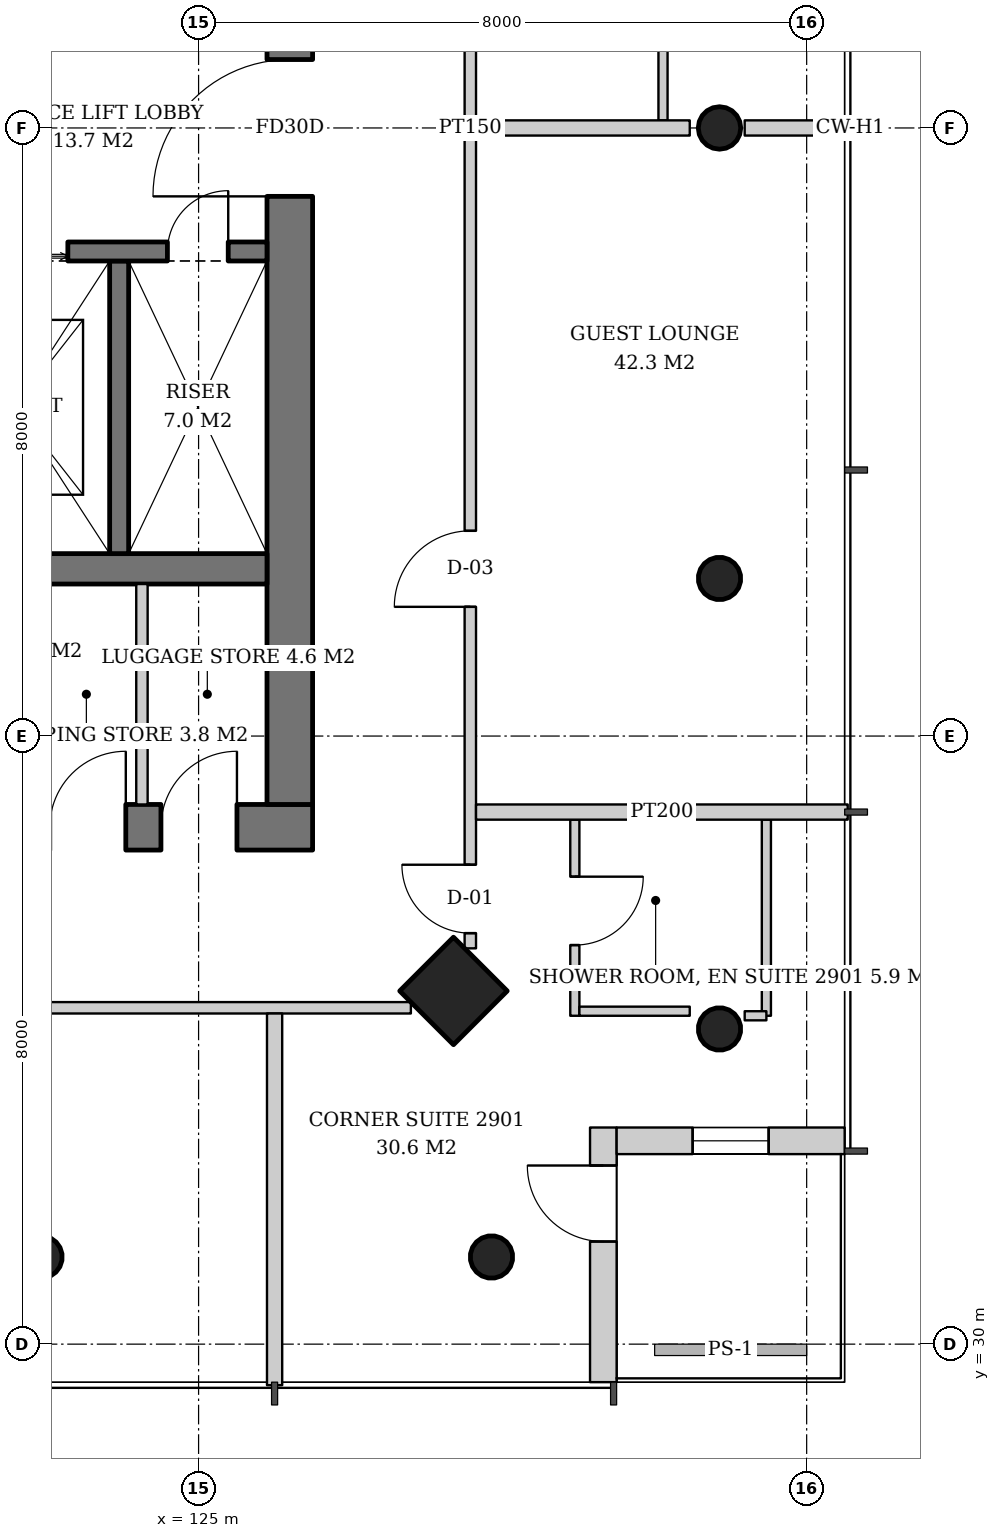
"""IFC4 building model, lengths in metres.
Left out: names, types, materials, properties, quantities, classifications, styles, units other than length and angle.
Written with IfcOpenShell. Run it as: python <this file> out.ifc"""

import sys

from ifc_helpers import new_model, si_unit, direction, frame, frame_2d, origin, origin_2d, place, context, subcontext, project, spatial, rectangle, hollow_circle, extrude, element, fill, save


model = new_model("IFC4")
c1 = context("Model", 3, precision=1e-05, world=origin(), true_north=direction((0.0, 1.0)))
c2 = subcontext(c1, "Body", "Model", "MODEL_VIEW")
j1 = project(units=[si_unit("LENGTHUNIT", "METRE"), si_unit("PLANEANGLEUNIT", "RADIAN")], contexts=[c1])
p1 = place(None, origin())
s1 = spatial("IfcSite", under=j1, at=p1, CompositionType="ELEMENT")
p2 = place(p1, origin())
s2 = spatial("IfcBuilding", under=s1, at=p2, CompositionType="ELEMENT")
p3 = place(p2, frame((0.0, 0.0, 116.0)))
s3 = spatial("IfcBuildingStorey", under=s2, at=p3, CompositionType="ELEMENT", Elevation=116.0)
p4 = place(p3, frame((131.905, 34.095, 0.0), z_axis=(-0.043029647111, 0.043029647111, 0.998146732169), x_axis=(-0.707106781187, -0.707106781187, 0.0)))
e1 = element("IfcColumn", 1, at=p4, inside=s3, PredefinedType="COLUMN", context=c2, shape_type="SweptSolid", body=[
    extrude(hollow_circle(Radius=0.28, WallThickness=0.02, at=origin_2d()), origin(), (0.0, 0.0, 1.0), 3.807),
])
p5 = place(p3, frame((131.905, 40.047, 0.0), z_axis=(-0.043059525333, 0.021561848751, 0.998839808957), x_axis=(-0.44774654769, -0.894160516368, 0.0)))
e2 = element("IfcColumn", 2, at=p5, inside=s3, PredefinedType="COLUMN", context=c2, shape_type="SweptSolid", body=[
    extrude(hollow_circle(Radius=0.28, WallThickness=0.02, at=origin_2d()), origin(), (0.0, 0.0, 1.0), 3.804),
])
p6 = place(p3, frame((131.905, 46.0, 0.0), z_axis=(-0.043069538298, 0.0, 0.999072076915), x_axis=(0.0, -1.0, 0.0)))
e3 = element("IfcColumn", 3, at=p6, inside=s3, PredefinedType="COLUMN", context=c2, shape_type="SweptSolid", body=[
    extrude(hollow_circle(Radius=0.28, WallThickness=0.02, at=origin_2d()), origin(), (0.0, 0.0, 1.0), 3.803),
])
p7 = place(p3, frame((128.405, 34.595, 0.0), z_axis=(-0.043029647111, 0.043029647111, 0.998146732169), x_axis=(-0.707106781187, -0.707106781187, 0.0)))
e4 = element("IfcColumn", 4, at=p7, inside=s3, PredefinedType="COLUMN", context=c2, shape_type="SweptSolid", body=[
    extrude(rectangle(XDim=1.0, YDim=1.0, at=origin_2d()), origin(), (0.0, 0.0, 1.0), 3.807),
])
p8 = place(p3, frame((128.905, 31.095, 0.0), z_axis=(-0.043029647111, 0.043029647111, 0.998146732169), x_axis=(-0.707106781187, -0.707106781187, 0.0)))
e5 = element("IfcColumn", 5, at=p8, inside=s3, PredefinedType="COLUMN", context=c2, shape_type="SweptSolid", body=[
    extrude(hollow_circle(Radius=0.28, WallThickness=0.02, at=origin_2d()), origin(), (0.0, 0.0, 1.0), 3.807),
])
p9 = place(p3, frame((122.953, 31.095, 0.0), z_axis=(-0.021561848751, 0.043059525333, 0.998839808957), x_axis=(-0.894160516368, -0.44774654769, 0.0)))
e6 = element("IfcColumn", 6, at=p9, inside=s3, PredefinedType="COLUMN", context=c2, shape_type="SweptSolid", body=[
    extrude(hollow_circle(Radius=0.28, WallThickness=0.02, at=origin_2d()), origin(), (0.0, 0.0, 1.0), 3.804),
])
p10 = place(p3, frame((107.5, 36.8, 0.0), z_axis=(0.0, 0.0, 1.0), x_axis=(1.0, 0.0, 0.0)))
e7 = element("IfcWall", 7, at=p10, inside=s3, PredefinedType="SHEAR", context=c2, shape_type="SweptSolid", body=[
    extrude(rectangle(XDim=19.0, YDim=0.6, at=frame_2d((9.5, 0.0))), origin(), (0.0, 0.0, 1.0), 3.8),
])
p11 = place(p10, frame((3.9, 0.0, 0.0)))
e8 = element("IfcOpeningElement", 8, at=p11, cuts=e7, PredefinedType="OPENING", context=c2, shape_type="SweptSolid", body=[
    extrude(rectangle(XDim=1.0, YDim=2.1, at=frame_2d((0.5, 1.05))), frame((0.0, 0.31, 0.0), z_axis=(0.0, -1.0, 0.0), x_axis=(1.0, 0.0, 0.0)), (0.0, 0.0, 1.0), 0.62),
])
p12 = place(p10, frame((14.08, 0.0, 0.0)))
e9 = element("IfcOpeningElement", 9, at=p12, cuts=e7, PredefinedType="OPENING", context=c2, shape_type="SweptSolid", body=[
    extrude(rectangle(XDim=1.0, YDim=2.1, at=frame_2d((0.5, 1.05))), frame((0.0, 0.31, 0.0), z_axis=(0.0, -1.0, 0.0), x_axis=(1.0, 0.0, 0.0)), (0.0, 0.0, 1.0), 0.62),
])
p13 = place(p10, frame((15.542, 0.0, 0.0)))
e10 = element("IfcOpeningElement", 10, at=p13, cuts=e7, PredefinedType="OPENING", context=c2, shape_type="SweptSolid", body=[
    extrude(rectangle(XDim=1.0, YDim=2.1, at=frame_2d((0.5, 1.05))), frame((0.0, 0.31, 0.0), z_axis=(0.0, -1.0, 0.0), x_axis=(1.0, 0.0, 0.0)), (0.0, 0.0, 1.0), 0.62),
])
p14 = place(p10, frame((17.005, 0.0, 0.0)))
e11 = element("IfcOpeningElement", 11, at=p14, cuts=e7, PredefinedType="OPENING", context=c2, shape_type="SweptSolid", body=[
    extrude(rectangle(XDim=1.0, YDim=2.1, at=frame_2d((0.5, 1.05))), frame((0.0, 0.31, 0.0), z_axis=(0.0, -1.0, 0.0), x_axis=(1.0, 0.0, 0.0)), (0.0, 0.0, 1.0), 0.62),
])
p15 = place(p3, frame((126.2, 37.1, 0.0), z_axis=(0.0, 0.0, 1.0), x_axis=(0.0, 1.0, 0.0)))
e12 = element("IfcWall", 12, at=p15, inside=s3, PredefinedType="SHEAR", context=c2, shape_type="SweptSolid", body=[
    extrude(rectangle(XDim=17.8, YDim=0.6, at=frame_2d((8.9, 0.0))), origin(), (0.0, 0.0, 1.0), 3.8),
])
p16 = place(p15, frame((8.0, 0.0, 0.0)))
e13 = element("IfcOpeningElement", 13, at=p16, cuts=e12, PredefinedType="OPENING", context=c2, shape_type="SweptSolid", body=[
    extrude(rectangle(XDim=1.8, YDim=2.4, at=frame_2d((0.9, 1.2))), frame((0.0, 0.31, 0.0), z_axis=(0.0, -1.0, 0.0), x_axis=(1.0, 0.0, 0.0)), (0.0, 0.0, 1.0), 0.62),
])
p17 = place(p3, frame((108.1, 40.2, 0.0), z_axis=(0.0, 0.0, 1.0), x_axis=(1.0, 0.0, 0.0)))
e14 = element("IfcWall", 14, at=p17, inside=s3, PredefinedType="SHEAR", context=c2, shape_type="SweptSolid", body=[
    extrude(rectangle(XDim=17.8, YDim=0.4, at=frame_2d((8.9, 0.0))), origin(), (0.0, 0.0, 1.0), 3.8),
])
p18 = place(p3, frame((130.325, 29.5, 0.0), z_axis=(0.0, 0.0, 1.0), x_axis=(0.0, 1.0, 0.0)))
e15 = element("IfcWall", 15, at=p18, inside=s3, PredefinedType="SOLIDWALL", context=c2, shape_type="SweptSolid", body=[
    extrude(rectangle(XDim=3.35, YDim=0.35, at=frame_2d((1.675, 0.0))), origin(), (0.0, 0.0, 1.0), 3.6),
])
p19 = place(p18, frame((1.85, 0.0, 0.0)))
e16 = element("IfcOpeningElement", 16, at=p19, cuts=e15, PredefinedType="OPENING", context=c2, shape_type="SweptSolid", body=[
    extrude(rectangle(XDim=1.0, YDim=2.4, at=frame_2d((0.5, 1.2))), frame((0.0, 0.185, 0.0), z_axis=(0.0, -1.0, 0.0), x_axis=(1.0, 0.0, 0.0)), (0.0, 0.0, 1.0), 0.37),
])
p20 = place(p3, frame((130.5, 32.675, 0.0), z_axis=(0.0, 0.0, 1.0), x_axis=(1.0, 0.0, 0.0)))
e17 = element("IfcWall", 17, at=p20, inside=s3, PredefinedType="SOLIDWALL", context=c2, shape_type="SweptSolid", body=[
    extrude(rectangle(XDim=3.0, YDim=0.35, at=frame_2d((1.5, 0.0))), origin(), (0.0, 0.0, 1.0), 3.6),
])
p21 = place(p20, frame((1.0, 0.0, 0.9)))
e18 = element("IfcOpeningElement", 18, at=p21, cuts=e17, PredefinedType="OPENING", context=c2, shape_type="SweptSolid", body=[
    extrude(rectangle(XDim=1.0, YDim=2.4, at=frame_2d((0.5, 1.2))), frame((0.0, 0.185, 0.0), z_axis=(0.0, -1.0, 0.0), x_axis=(1.0, 0.0, 0.0)), (0.0, 0.0, 1.0), 0.37),
])
p22 = place(p3, frame((123.955, 44.25, 0.0), z_axis=(0.0, 0.0, 1.0), x_axis=(0.0, -1.0, 0.0)))
e19 = element("IfcWall", 19, at=p22, inside=s3, PredefinedType="SHEAR", context=c2, shape_type="SweptSolid", body=[
    extrude(rectangle(XDim=3.85, YDim=0.25, at=frame_2d((1.925, 0.0))), origin(), (0.0, 0.0, 1.0), 3.8),
])
p23 = place(p3, frame((121.33, 44.375, 0.0), z_axis=(0.0, 0.0, 1.0), x_axis=(1.0, 0.0, 0.0)))
e20 = element("IfcWall", 20, at=p23, inside=s3, PredefinedType="SHEAR", context=c2, shape_type="SweptSolid", body=[
    extrude(rectangle(XDim=4.57, YDim=0.25, at=frame_2d((2.285, 0.0))), origin(), (0.0, 0.0, 1.0), 3.8),
])
p24 = place(p23, frame((0.55, 0.0, 0.0)))
e21 = element("IfcOpeningElement", 21, at=p24, cuts=e20, PredefinedType="OPENING", context=c2, shape_type="SweptSolid", body=[
    extrude(rectangle(XDim=1.4, YDim=2.4, at=frame_2d((0.7, 1.2))), frame((0.0, 0.135, 0.0), z_axis=(0.0, -1.0, 0.0), x_axis=(1.0, 0.0, 0.0)), (0.0, 0.0, 1.0), 0.27),
])
p25 = place(p23, frame((3.26, 0.0, 0.0)))
e22 = element("IfcOpeningElement", 22, at=p25, cuts=e20, PredefinedType="OPENING", context=c2, shape_type="SweptSolid", body=[
    extrude(rectangle(XDim=0.8, YDim=2.0, at=frame_2d((0.4, 1.0))), frame((0.0, 0.135, 0.0), z_axis=(0.0, -1.0, 0.0), x_axis=(1.0, 0.0, 0.0)), (0.0, 0.0, 1.0), 0.27),
])
p26 = place(p3, frame((124.255, 37.1, 0.0), z_axis=(0.0, 0.0, 1.0), x_axis=(0.0, 1.0, 0.0)))
e23 = element("IfcWall", 23, at=p26, inside=s3, PredefinedType="SOLIDWALL", context=c2, shape_type="SweptSolid", body=[
    extrude(rectangle(XDim=2.9, YDim=0.15, at=frame_2d((1.45, 0.0))), origin(), (0.0, 0.0, 1.0), 3.6),
])
p27 = place(p3, frame((129.95, 36.9, 0.0), z_axis=(0.0, 0.0, 1.0), x_axis=(0.0, -1.0, 0.0)))
e24 = element("IfcWall", 24, at=p27, inside=s3, PredefinedType="PARTITIONING", context=c2, shape_type="SweptSolid", body=[
    extrude(rectangle(XDim=2.58, YDim=0.12, at=frame_2d((1.29, 0.0))), origin(), (0.0, 0.0, 1.0), 2.9),
])
p28 = place(p27, frame((0.75, 0.0, 0.0)))
e25 = element("IfcOpeningElement", 25, at=p28, cuts=e24, PredefinedType="OPENING", context=c2, shape_type="SweptSolid", body=[
    extrude(rectangle(XDim=0.9, YDim=2.1, at=frame_2d((0.45, 1.05))), frame((0.0, 0.07, 0.0), z_axis=(0.0, -1.0, 0.0), x_axis=(1.0, 0.0, 0.0)), (0.0, 0.0, 1.0), 0.14),
])
p29 = place(p3, frame((132.47, 36.9, 0.0), z_axis=(0.0, 0.0, 1.0), x_axis=(0.0, -1.0, 0.0)))
e26 = element("IfcWall", 26, at=p29, inside=s3, PredefinedType="PARTITIONING", context=c2, shape_type="SweptSolid", body=[
    extrude(rectangle(XDim=2.58, YDim=0.12, at=frame_2d((1.29, 0.0))), origin(), (0.0, 0.0, 1.0), 3.6),
])
p30 = place(p3, frame((130.01, 34.38, 0.0), z_axis=(0.0, 0.0, 1.0), x_axis=(1.0, 0.0, 0.0)))
e27 = element("IfcWall", 27, at=p30, inside=s3, PredefinedType="PARTITIONING", context=c2, shape_type="SweptSolid", body=[
    extrude(rectangle(XDim=1.452, YDim=0.12, at=frame_2d((0.726, 0.0))), origin(), (0.0, 0.0, 1.0), 3.2),
])
p31 = place(p3, frame((131.11, 46.1, 0.0), z_axis=(0.0, 0.0, 1.0), x_axis=(0.0, 1.0, 0.0)))
e28 = element("IfcWall", 28, at=p31, inside=s3, PredefinedType="PARTITIONING", context=c2, shape_type="SweptSolid", body=[
    extrude(rectangle(XDim=2.42, YDim=0.12, at=frame_2d((1.21, 0.0))), origin(), (0.0, 0.0, 1.0), 3.6),
])
p32 = place(p3, frame((128.575, 35.207, 0.0), z_axis=(0.0, 0.0, 1.0), x_axis=(0.0, 1.0, 0.0)))
e29 = element("IfcWall", 29, at=p32, inside=s3, PredefinedType="PARTITIONING", context=c2, shape_type="SweptSolid", body=[
    extrude(rectangle(XDim=21.586, YDim=0.15, at=frame_2d((10.793, 0.0))), origin(), (0.0, 0.0, 1.0), 2.9),
])
p33 = place(p32, frame((0.2, 0.0, 0.0)))
e30 = element("IfcOpeningElement", 30, at=p33, cuts=e29, PredefinedType="OPENING", context=c2, shape_type="SweptSolid", body=[
    extrude(rectangle(XDim=0.9, YDim=2.1, at=frame_2d((0.45, 1.05))), frame((0.0, 0.085, 0.0), z_axis=(0.0, -1.0, 0.0), x_axis=(1.0, 0.0, 0.0)), (0.0, 0.0, 1.0), 0.17),
])
p34 = place(p32, frame((4.493, 0.0, 0.0)))
e31 = element("IfcOpeningElement", 31, at=p34, cuts=e29, PredefinedType="OPENING", context=c2, shape_type="SweptSolid", body=[
    extrude(rectangle(XDim=1.0, YDim=2.1, at=frame_2d((0.5, 1.05))), frame((0.0, 0.085, 0.0), z_axis=(0.0, -1.0, 0.0), x_axis=(1.0, 0.0, 0.0)), (0.0, 0.0, 1.0), 0.17),
])
p35 = place(p32, frame((13.543, 0.0, 0.0)))
e32 = element("IfcOpeningElement", 32, at=p35, cuts=e29, PredefinedType="OPENING", context=c2, shape_type="SweptSolid", body=[
    extrude(rectangle(XDim=0.9, YDim=2.1, at=frame_2d((0.45, 1.05))), frame((0.0, 0.085, 0.0), z_axis=(0.0, -1.0, 0.0), x_axis=(1.0, 0.0, 0.0)), (0.0, 0.0, 1.0), 0.17),
])
p36 = place(p3, frame((128.65, 37.0, 0.0), z_axis=(0.0, 0.0, 1.0), x_axis=(1.0, 0.0, 0.0)))
e33 = element("IfcWall", 33, at=p36, inside=s3, PredefinedType="PARTITIONING", context=c2, shape_type="SweptSolid", body=[
    extrude(rectangle(XDim=4.89, YDim=0.2, at=frame_2d((2.445, 0.0))), origin(), (0.0, 0.0, 1.0), 2.9),
])
p37 = place(p3, frame((128.65, 46.0, 0.0), z_axis=(0.0, 0.0, 1.0), x_axis=(1.0, 0.0, 0.0)))
e34 = element("IfcWall", 34, at=p37, inside=s3, PredefinedType="PARTITIONING", context=c2, shape_type="SweptSolid", body=[
    extrude(rectangle(XDim=2.812, YDim=0.2, at=frame_2d((1.406, 0.0))), origin(), (0.0, 0.0, 1.0), 3.6),
])
p38 = place(p3, frame((132.185, 46.0, 0.0), z_axis=(0.0, 0.0, 1.0), x_axis=(1.0, 0.0, 0.0)))
e35 = element("IfcWall", 35, at=p38, inside=s3, PredefinedType="PARTITIONING", context=c2, shape_type="SweptSolid", body=[
    extrude(rectangle(XDim=1.355, YDim=0.2, at=frame_2d((0.678, 0.0))), origin(), (0.0, 0.0, 1.0), 3.6),
])
p39 = place(p3, frame((106.207, 34.425, 0.0), z_axis=(0.0, 0.0, 1.0), x_axis=(1.0, 0.0, 0.0)))
e36 = element("IfcWall", 36, at=p39, inside=s3, PredefinedType="PARTITIONING", context=c2, shape_type="SweptSolid", body=[
    extrude(rectangle(XDim=21.586, YDim=0.15, at=frame_2d((10.793, 0.0))), origin(), (0.0, 0.0, 1.0), 2.9),
])
p40 = place(p39, frame((0.2, 0.0, 0.0)))
e37 = element("IfcOpeningElement", 37, at=p40, cuts=e36, PredefinedType="OPENING", context=c2, shape_type="SweptSolid", body=[
    extrude(rectangle(XDim=0.9, YDim=2.1, at=frame_2d((0.45, 1.05))), frame((0.0, 0.085, 0.0), z_axis=(0.0, -1.0, 0.0), x_axis=(1.0, 0.0, 0.0)), (0.0, 0.0, 1.0), 0.17),
])
p41 = place(p39, frame((4.543, 0.0, 0.0)))
e38 = element("IfcOpeningElement", 38, at=p41, cuts=e36, PredefinedType="OPENING", context=c2, shape_type="SweptSolid", body=[
    extrude(rectangle(XDim=0.9, YDim=2.1, at=frame_2d((0.45, 1.05))), frame((0.0, 0.085, 0.0), z_axis=(0.0, -1.0, 0.0), x_axis=(1.0, 0.0, 0.0)), (0.0, 0.0, 1.0), 0.17),
])
p42 = place(p39, frame((13.493, 0.0, 0.0)))
e39 = element("IfcOpeningElement", 39, at=p42, cuts=e36, PredefinedType="OPENING", context=c2, shape_type="SweptSolid", body=[
    extrude(rectangle(XDim=1.0, YDim=2.1, at=frame_2d((0.5, 1.05))), frame((0.0, 0.085, 0.0), z_axis=(0.0, -1.0, 0.0), x_axis=(1.0, 0.0, 0.0)), (0.0, 0.0, 1.0), 0.17),
])
p43 = place(p3, frame((126.0, 34.35, 0.0), z_axis=(0.0, 0.0, 1.0), x_axis=(0.0, -1.0, 0.0)))
e40 = element("IfcWall", 40, at=p43, inside=s3, PredefinedType="PARTITIONING", context=c2, shape_type="SweptSolid", body=[
    extrude(rectangle(XDim=4.89, YDim=0.2, at=frame_2d((2.445, 0.0))), origin(), (0.0, 0.0, 1.0), 3.2),
])
p44 = place(p3, frame((132.47, 34.32, 0.0), z_axis=(0.0, 0.0, 1.0), x_axis=(-1.0, 0.0, 0.0)))
e41 = element("IfcWall", 41, at=p44, inside=s3, PredefinedType="PARTITIONING", context=c2, shape_type="SweptSolid", body=[
    extrude(rectangle(XDim=0.285, YDim=0.12, at=frame_2d((0.143, 0.0))), origin(), (0.0, 0.0, 1.0), 3.6),
])
p45 = place(p19, origin())
e42 = element("IfcDoor", 42, at=p45, inside=s3, OperationType="SINGLE_SWING_RIGHT", PredefinedType="DOOR", context=c2, shape_type="SweptSolid", body=[
    extrude(rectangle(XDim=1.0, YDim=2.4, at=frame_2d((0.5, 1.2))), frame((0.0, 0.025, 0.0), z_axis=(0.0, -1.0, 0.0), x_axis=(1.0, 0.0, 0.0)), (0.0, 0.0, 1.0), 0.05),
])
fill(e16, e42)
p46 = place(p21, origin())
e43 = element("IfcWindow", 43, at=p46, inside=s3, PartitioningType="SINGLE_PANEL", PredefinedType="WINDOW", context=c2, shape_type="SweptSolid", body=[
    extrude(rectangle(XDim=1.0, YDim=2.4, at=frame_2d((0.5, 1.2))), frame((0.0, 0.03, 0.0), z_axis=(0.0, -1.0, 0.0), x_axis=(1.0, 0.0, 0.0)), (0.0, 0.0, 1.0), 0.06),
])
fill(e18, e43)
p47 = place(p24, origin())
e44 = element("IfcDoor", 44, at=p47, inside=s3, OperationType="DOUBLE_DOOR_SLIDING", PredefinedType="DOOR", context=c2, shape_type="SweptSolid", body=[
    extrude(rectangle(XDim=1.4, YDim=2.4, at=frame_2d((0.7, 1.2))), frame((0.0, 0.025, 0.0), z_axis=(0.0, -1.0, 0.0), x_axis=(1.0, 0.0, 0.0)), (0.0, 0.0, 1.0), 0.05),
])
fill(e21, e44)
p48 = place(p25, origin())
e45 = element("IfcDoor", 45, at=p48, inside=s3, OperationType="SINGLE_SWING_RIGHT", PredefinedType="DOOR", context=c2, shape_type="SweptSolid", body=[
    extrude(rectangle(XDim=0.8, YDim=2.0, at=frame_2d((0.4, 1.0))), frame((0.0, 0.025, 0.0), z_axis=(0.0, -1.0, 0.0), x_axis=(1.0, 0.0, 0.0)), (0.0, 0.0, 1.0), 0.05),
])
fill(e22, e45)
p49 = place(p16, origin())
e46 = element("IfcDoor", 46, at=p49, inside=s3, OperationType="DOUBLE_DOOR_SINGLE_SWING", PredefinedType="DOOR", context=c2, shape_type="SweptSolid", body=[
    extrude(rectangle(XDim=1.8, YDim=2.4, at=frame_2d((0.9, 1.2))), frame((0.0, 0.025, 0.0), z_axis=(0.0, -1.0, 0.0), x_axis=(1.0, 0.0, 0.0)), (0.0, 0.0, 1.0), 0.05),
])
fill(e13, e46)
p50 = place(p13, origin())
e47 = element("IfcDoor", 47, at=p50, inside=s3, OperationType="SINGLE_SWING_RIGHT", PredefinedType="DOOR", context=c2, shape_type="SweptSolid", body=[
    extrude(rectangle(XDim=1.0, YDim=2.1, at=frame_2d((0.5, 1.05))), frame((0.0, 0.29, 0.0), z_axis=(0.0, -1.0, 0.0), x_axis=(1.0, 0.0, 0.0)), (0.0, 0.0, 1.0), 0.05),
])
fill(e10, e47)
p51 = place(p14, origin())
e48 = element("IfcDoor", 48, at=p51, inside=s3, OperationType="SINGLE_SWING_RIGHT", PredefinedType="DOOR", context=c2, shape_type="SweptSolid", body=[
    extrude(rectangle(XDim=1.0, YDim=2.1, at=frame_2d((0.5, 1.05))), frame((0.0, 0.29, 0.0), z_axis=(0.0, -1.0, 0.0), x_axis=(1.0, 0.0, 0.0)), (0.0, 0.0, 1.0), 0.05),
])
fill(e11, e48)
p52 = place(p28, origin())
e49 = element("IfcDoor", 49, at=p52, inside=s3, OperationType="SINGLE_SWING_LEFT", PredefinedType="DOOR", context=c2, shape_type="SweptSolid", body=[
    extrude(rectangle(XDim=0.9, YDim=2.1, at=frame_2d((0.45, 1.05))), frame((0.0, 0.025, 0.0), z_axis=(0.0, -1.0, 0.0), x_axis=(1.0, 0.0, 0.0)), (0.0, 0.0, 1.0), 0.05),
])
fill(e25, e49)
p53 = place(p33, origin())
e50 = element("IfcDoor", 50, at=p53, inside=s3, OperationType="SINGLE_SWING_RIGHT", PredefinedType="DOOR", context=c2, shape_type="SweptSolid", body=[
    extrude(rectangle(XDim=0.9, YDim=2.1, at=frame_2d((0.45, 1.05))), frame((0.0, 0.025, 0.0), z_axis=(0.0, -1.0, 0.0), x_axis=(1.0, 0.0, 0.0)), (0.0, 0.0, 1.0), 0.05),
])
fill(e30, e50)
p54 = place(p34, origin())
e51 = element("IfcDoor", 51, at=p54, inside=s3, OperationType="SINGLE_SWING_LEFT", PredefinedType="DOOR", context=c2, shape_type="SweptSolid", body=[
    extrude(rectangle(XDim=1.0, YDim=2.1, at=frame_2d((0.5, 1.05))), frame((0.0, 0.025, 0.0), z_axis=(0.0, -1.0, 0.0), x_axis=(1.0, 0.0, 0.0)), (0.0, 0.0, 1.0), 0.05),
])
fill(e31, e51)
save(model, sys.argv[1])
